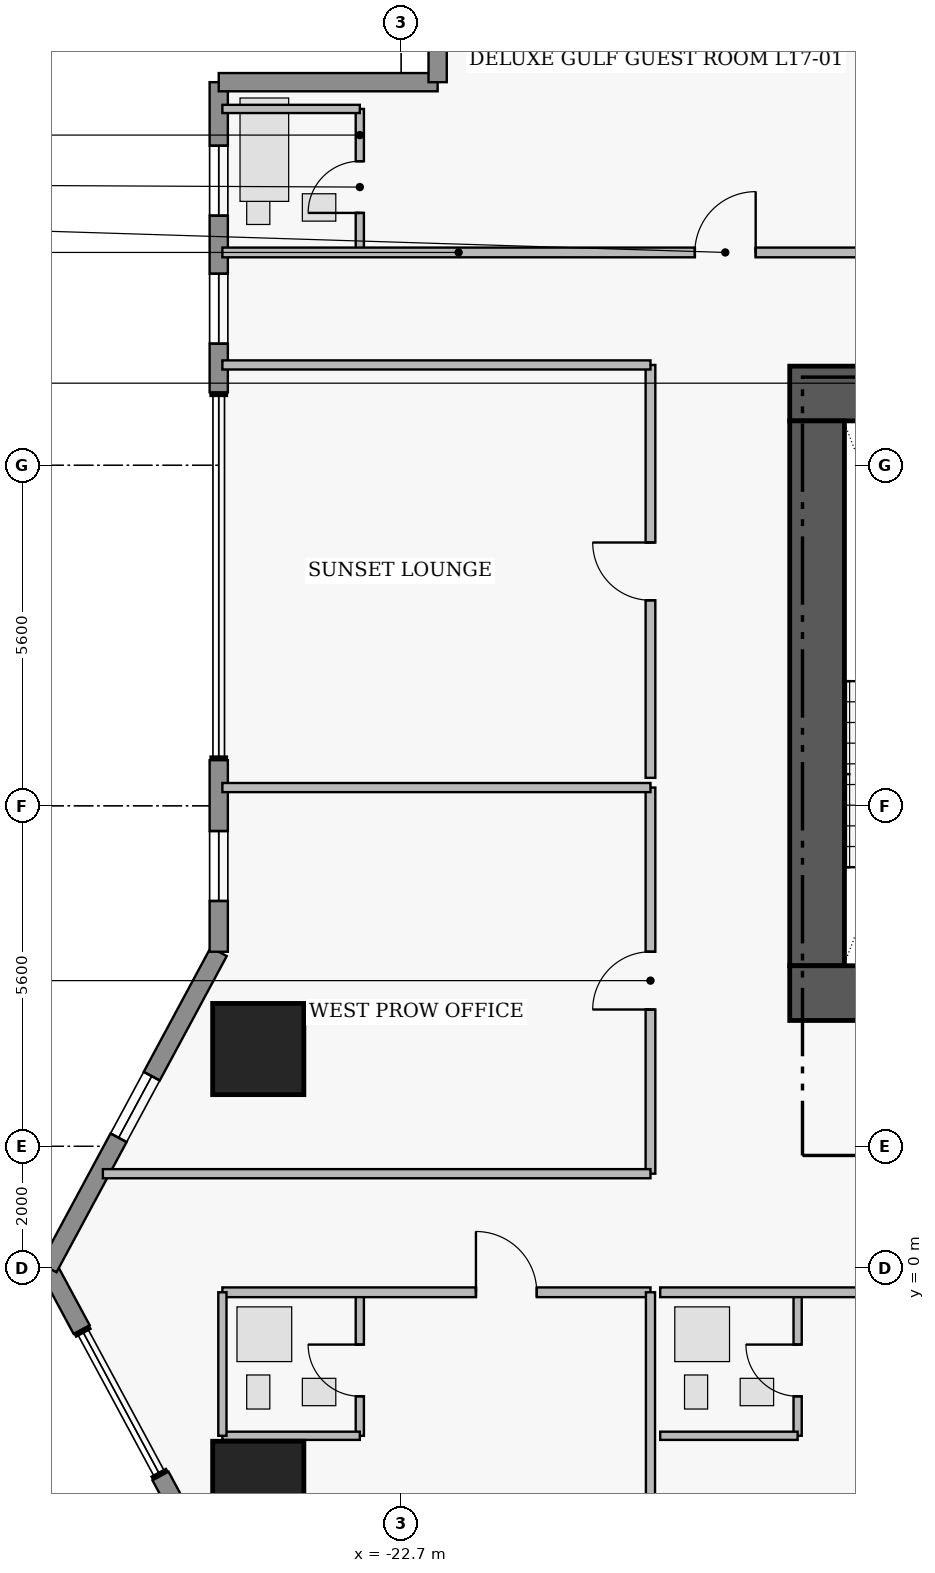
"""IFC4 building model, lengths in metres.
Left out: names, types, materials, properties, quantities, classifications, styles, units other than length and angle.
Written with IfcOpenShell. Run it as: python <this file> out.ifc"""

import sys

from ifc_helpers import new_model, si_unit, direction, frame, frame_2d, origin, origin_2d, place, context, subcontext, project, spatial, rectangle, extrude, element, fill, save


model = new_model("IFC4")
c1 = context("Model", 3, precision=1e-05, world=origin(), true_north=direction((0.0, 1.0)))
c2 = subcontext(c1, "Body", "Model", "MODEL_VIEW")
j1 = project(units=[si_unit("LENGTHUNIT", "METRE"), si_unit("PLANEANGLEUNIT", "RADIAN")], contexts=[c1])
p1 = place(None, origin())
s1 = spatial("IfcSite", under=j1, at=p1, CompositionType="ELEMENT")
p2 = place(p1, origin())
s2 = spatial("IfcBuilding", under=s1, at=p2, CompositionType="ELEMENT")
p3 = place(p2, frame((0.0, 0.0, 71.4)))
s3 = spatial("IfcBuildingStorey", under=s2, at=p3, CompositionType="ELEMENT", Elevation=71.4)
p4 = place(p3, frame((-16.31, 14.38, 0.0), z_axis=(0.0, 0.0, 1.0), x_axis=(1.0, 0.0, 0.0)))
e1 = element("IfcWall", 1, at=p4, inside=s3, PredefinedType="SHEAR", context=c2, shape_type="SweptSolid", body=[
    extrude(rectangle(XDim=4.71, YDim=0.9, at=frame_2d((2.355, 0.0))), origin(), (0.0, 0.0, 1.0), 3.46),
])
p5 = place(p3, frame((-15.86, 4.97, 0.0), z_axis=(0.0, 0.0, 1.0), x_axis=(0.0, 1.0, 0.0)))
e2 = element("IfcWall", 2, at=p5, inside=s3, PredefinedType="SHEAR", context=c2, shape_type="SweptSolid", body=[
    extrude(rectangle(XDim=8.96, YDim=0.9, at=frame_2d((4.48, 0.0))), origin(), (0.0, 0.0, 1.0), 3.46),
])
p6 = place(p3, frame((-16.31, 4.52, 0.0), z_axis=(0.0, 0.0, 1.0), x_axis=(1.0, 0.0, 0.0)))
e3 = element("IfcWall", 3, at=p6, inside=s3, PredefinedType="SHEAR", context=c2, shape_type="SweptSolid", body=[
    extrude(rectangle(XDim=4.71, YDim=0.9, at=frame_2d((2.355, 0.0))), origin(), (0.0, 0.0, 1.0), 3.46),
])
for number, where, z_axis, x_axis in (
    (4, (-25.05, -3.6, 0.0), (0.0, 0.0, 1.0), (1.0, 0.0, 0.0)),
    (5, (-25.05, 3.6, 0.0), (0.0, 0.0, 1.0), (1.0, 0.0, 0.0)),
):
    element("IfcColumn", number, at=place(p3, frame(where, z_axis=z_axis, x_axis=x_axis)), inside=s3, PredefinedType="COLUMN", context=c2, shape_type="SweptSolid", body=[
        extrude(rectangle(XDim=1.5, YDim=1.5, at=origin_2d()), origin(), (0.0, 0.0, 1.0), 3.65),
    ])
p7 = place(p3, frame((-25.7, -5.2, 0.0), z_axis=(0.0, 0.0, 1.0), x_axis=(-0.474121438562, 0.88045946045, 0.0)))
e6 = element("IfcWall", 6, at=p7, inside=s3, PredefinedType="STANDARD", context=c2, shape_type="SweptSolid", body=[
    extrude(rectangle(XDim=2.021, YDim=0.3, at=frame_2d((1.01, 0.0))), origin(), (0.0, 0.0, 1.0), 3.43),
])
p8 = place(p3, frame((-27.955, -1.012, 0.0), z_axis=(0.0, 0.0, 1.0), x_axis=(-0.474099823035, 0.880471099922, 0.0)))
e7 = element("IfcWall", 7, at=p8, inside=s3, PredefinedType="STANDARD", context=c2, shape_type="SweptSolid", body=[
    extrude(rectangle(XDim=1.15, YDim=0.3, at=frame_2d((0.575, 0.0))), origin(), (0.0, 0.0, 1.0), 3.43),
])
p9 = place(p3, frame((-28.5, 0.0, 0.0), z_axis=(0.0, 0.0, 1.0), x_axis=(0.474109683532, 0.880465790352, 0.0)))
e8 = element("IfcWall", 8, at=p9, inside=s3, PredefinedType="STANDARD", context=c2, shape_type="SweptSolid", body=[
    extrude(rectangle(XDim=5.906, YDim=0.3, at=frame_2d((2.953, 0.0))), origin(), (0.0, 0.0, 1.0), 3.43),
])
p10 = place(p9, frame((2.432, 0.0, 0.95)))
e9 = element("IfcOpeningElement", 9, at=p10, cuts=e8, PredefinedType="OPENING", context=c2, shape_type="SweptSolid", body=[
    extrude(rectangle(XDim=1.15, YDim=1.55, at=frame_2d((0.575, 0.775))), frame((0.0, 0.16, 0.0), z_axis=(0.0, -1.0, 0.0), x_axis=(1.0, 0.0, 0.0)), (0.0, 0.0, 1.0), 0.32),
])
p11 = place(p3, frame((-25.7, 5.2, 0.0), z_axis=(0.0, 0.0, 1.0), x_axis=(0.0, 1.0, 0.0)))
e10 = element("IfcWall", 10, at=p11, inside=s3, PredefinedType="STANDARD", context=c2, shape_type="SweptSolid", body=[
    extrude(rectangle(XDim=3.15, YDim=0.3, at=frame_2d((1.575, 0.0))), origin(), (0.0, 0.0, 1.0), 3.43),
])
p12 = place(p11, frame((0.835, 0.0, 0.95)))
e11 = element("IfcOpeningElement", 11, at=p12, cuts=e10, PredefinedType="OPENING", context=c2, shape_type="SweptSolid", body=[
    extrude(rectangle(XDim=1.15, YDim=1.55, at=frame_2d((0.575, 0.775))), frame((0.0, 0.16, 0.0), z_axis=(0.0, -1.0, 0.0), x_axis=(1.0, 0.0, 0.0)), (0.0, 0.0, 1.0), 0.32),
])
p13 = place(p3, frame((-25.7, 14.4, 0.0), z_axis=(0.0, 0.0, 1.0), x_axis=(0.0, 1.0, 0.0)))
e12 = element("IfcWall", 12, at=p13, inside=s3, PredefinedType="STANDARD", context=c2, shape_type="SweptSolid", body=[
    extrude(rectangle(XDim=5.1, YDim=0.3, at=frame_2d((2.55, 0.0))), origin(), (0.0, 0.0, 1.0), 3.43),
])
p14 = place(p13, frame((0.8, 0.0, 0.95)))
e13 = element("IfcOpeningElement", 13, at=p14, cuts=e12, PredefinedType="OPENING", context=c2, shape_type="SweptSolid", body=[
    extrude(rectangle(XDim=1.15, YDim=1.55, at=frame_2d((0.575, 0.775))), frame((0.0, 0.16, 0.0), z_axis=(0.0, -1.0, 0.0), x_axis=(1.0, 0.0, 0.0)), (0.0, 0.0, 1.0), 0.32),
])
p15 = place(p13, frame((2.905, 0.0, 0.95)))
e14 = element("IfcOpeningElement", 14, at=p15, cuts=e12, PredefinedType="OPENING", context=c2, shape_type="SweptSolid", body=[
    extrude(rectangle(XDim=1.15, YDim=1.55, at=frame_2d((0.575, 0.775))), frame((0.0, 0.16, 0.0), z_axis=(0.0, -1.0, 0.0), x_axis=(1.0, 0.0, 0.0)), (0.0, 0.0, 1.0), 0.32),
])
p16 = place(p3, frame((-25.7, 19.5, 0.0), z_axis=(0.0, 0.0, 1.0), x_axis=(1.0, 0.0, 0.0)))
e15 = element("IfcWall", 15, at=p16, inside=s3, PredefinedType="STANDARD", context=c2, shape_type="SweptSolid", body=[
    extrude(rectangle(XDim=3.6, YDim=0.3, at=frame_2d((1.8, 0.0))), origin(), (0.0, 0.0, 1.0), 3.43),
])
p17 = place(p3, frame((-22.1, 19.5, 0.0), z_axis=(0.0, 0.0, 1.0), x_axis=(0.0, 1.0, 0.0)))
e16 = element("IfcWall", 16, at=p17, inside=s3, PredefinedType="STANDARD", context=c2, shape_type="SweptSolid", body=[
    extrude(rectangle(XDim=3.6, YDim=0.3, at=frame_2d((1.8, 0.0))), origin(), (0.0, 0.0, 1.0), 3.43),
])
p18 = place(p3, frame((-23.38, 16.7, 0.0), z_axis=(0.0, 0.0, 1.0), x_axis=(0.0, 1.0, 0.0)))
e17 = element("IfcWall", 17, at=p18, inside=s3, PredefinedType="PLUMBINGWALL", context=c2, shape_type="SweptSolid", body=[
    extrude(rectangle(XDim=2.36, YDim=0.135, at=frame_2d((1.18, 0.0))), origin(), (0.0, 0.0, 1.0), 3.43),
])
p19 = place(p18, frame((0.65, 0.0, 0.0)))
e18 = element("IfcOpeningElement", 18, at=p19, cuts=e17, PredefinedType="OPENING", context=c2, shape_type="SweptSolid", body=[
    extrude(rectangle(XDim=0.85, YDim=2.1, at=frame_2d((0.425, 1.05))), frame((0.0, 0.077, 0.0), z_axis=(0.0, -1.0, 0.0), x_axis=(1.0, 0.0, 0.0)), (0.0, 0.0, 1.0), 0.155),
])
p20 = place(p3, frame((-25.64, 16.7, 0.0), z_axis=(0.0, 0.0, 1.0), x_axis=(1.0, 0.0, 0.0)))
e19 = element("IfcWall", 19, at=p20, inside=s3, PredefinedType="PARTITIONING", context=c2, shape_type="SweptSolid", body=[
    extrude(rectangle(XDim=14.24, YDim=0.16, at=frame_2d((7.12, 0.0))), origin(), (0.0, 0.0, 1.0), 2.973),
])
p21 = place(p20, frame((7.77, 0.0, 0.0)))
e20 = element("IfcOpeningElement", 20, at=p21, cuts=e19, PredefinedType="OPENING", context=c2, shape_type="SweptSolid", body=[
    extrude(rectangle(XDim=1.0, YDim=2.15, at=frame_2d((0.5, 1.075))), frame((0.0, 0.09, 0.0), z_axis=(0.0, -1.0, 0.0), x_axis=(1.0, 0.0, 0.0)), (0.0, 0.0, 1.0), 0.18),
])
p22 = place(p3, frame((-23.38, -2.76, 0.0), z_axis=(0.0, 0.0, 1.0), x_axis=(0.0, 1.0, 0.0)))
e21 = element("IfcWall", 21, at=p22, inside=s3, PredefinedType="PLUMBINGWALL", context=c2, shape_type="SweptSolid", body=[
    extrude(rectangle(XDim=2.36, YDim=0.135, at=frame_2d((1.18, 0.0))), origin(), (0.0, 0.0, 1.0), 3.43),
])
p23 = place(p22, frame((0.65, 0.0, 0.0)))
e22 = element("IfcOpeningElement", 22, at=p23, cuts=e21, PredefinedType="OPENING", context=c2, shape_type="SweptSolid", body=[
    extrude(rectangle(XDim=0.85, YDim=2.1, at=frame_2d((0.425, 1.05))), frame((0.0, 0.077, 0.0), z_axis=(0.0, -1.0, 0.0), x_axis=(1.0, 0.0, 0.0)), (0.0, 0.0, 1.0), 0.155),
])
p24 = place(p3, frame((-25.64, -0.4, 0.0), z_axis=(0.0, 0.0, 1.0), x_axis=(1.0, 0.0, 0.0)))
e23 = element("IfcWall", 23, at=p24, inside=s3, PredefinedType="PARTITIONING", context=c2, shape_type="SweptSolid", body=[
    extrude(rectangle(XDim=7.04, YDim=0.16, at=frame_2d((3.52, 0.0))), origin(), (0.0, 0.0, 1.0), 3.43),
])
p25 = place(p24, frame((4.17, 0.0, 0.0)))
e24 = element("IfcOpeningElement", 24, at=p25, cuts=e23, PredefinedType="OPENING", context=c2, shape_type="SweptSolid", body=[
    extrude(rectangle(XDim=1.0, YDim=2.15, at=frame_2d((0.5, 1.075))), frame((0.0, 0.09, 0.0), z_axis=(0.0, -1.0, 0.0), x_axis=(1.0, 0.0, 0.0)), (0.0, 0.0, 1.0), 0.18),
])
p26 = place(p3, frame((-16.18, -2.76, 0.0), z_axis=(0.0, 0.0, 1.0), x_axis=(0.0, 1.0, 0.0)))
e25 = element("IfcWall", 25, at=p26, inside=s3, PredefinedType="PLUMBINGWALL", context=c2, shape_type="SweptSolid", body=[
    extrude(rectangle(XDim=2.36, YDim=0.135, at=frame_2d((1.18, 0.0))), origin(), (0.0, 0.0, 1.0), 3.43),
])
p27 = place(p26, frame((0.65, 0.0, 0.0)))
e26 = element("IfcOpeningElement", 26, at=p27, cuts=e25, PredefinedType="OPENING", context=c2, shape_type="SweptSolid", body=[
    extrude(rectangle(XDim=0.85, YDim=2.1, at=frame_2d((0.425, 1.05))), frame((0.0, 0.077, 0.0), z_axis=(0.0, -1.0, 0.0), x_axis=(1.0, 0.0, 0.0)), (0.0, 0.0, 1.0), 0.155),
])
p28 = place(p3, frame((-18.44, -0.4, 0.0), z_axis=(0.0, 0.0, 1.0), x_axis=(1.0, 0.0, 0.0)))
e27 = element("IfcWall", 27, at=p28, inside=s3, PredefinedType="PARTITIONING", context=c2, shape_type="SweptSolid", body=[
    extrude(rectangle(XDim=7.04, YDim=0.16, at=frame_2d((3.52, 0.0))), origin(), (0.0, 0.0, 1.0), 3.43),
])
p29 = place(p28, frame((4.17, 0.0, 0.0)))
e28 = element("IfcOpeningElement", 28, at=p29, cuts=e27, PredefinedType="OPENING", context=c2, shape_type="SweptSolid", body=[
    extrude(rectangle(XDim=1.0, YDim=2.15, at=frame_2d((0.5, 1.075))), frame((0.0, 0.09, 0.0), z_axis=(0.0, -1.0, 0.0), x_axis=(1.0, 0.0, 0.0)), (0.0, 0.0, 1.0), 0.18),
])
p30 = place(p3, frame((-18.6, 1.55, 0.0), z_axis=(0.0, 0.0, 1.0), x_axis=(0.0, 1.0, 0.0)))
e29 = element("IfcWall", 29, at=p30, inside=s3, PredefinedType="PARTITIONING", context=c2, shape_type="SweptSolid", body=[
    extrude(rectangle(XDim=6.35, YDim=0.16, at=frame_2d((3.175, 0.0))), origin(), (0.0, 0.0, 1.0), 3.43),
])
p31 = place(p30, frame((2.7, 0.0, 0.0)))
e30 = element("IfcOpeningElement", 30, at=p31, cuts=e29, PredefinedType="OPENING", context=c2, shape_type="SweptSolid", body=[
    extrude(rectangle(XDim=0.95, YDim=2.15, at=frame_2d((0.475, 1.075))), frame((0.0, 0.09, 0.0), z_axis=(0.0, -1.0, 0.0), x_axis=(1.0, 0.0, 0.0)), (0.0, 0.0, 1.0), 0.18),
])
p32 = place(p3, frame((-18.6, 8.06, 0.0), z_axis=(0.0, 0.0, 1.0), x_axis=(0.0, 1.0, 0.0)))
e31 = element("IfcWall", 31, at=p32, inside=s3, PredefinedType="PARTITIONING", context=c2, shape_type="SweptSolid", body=[
    extrude(rectangle(XDim=6.79, YDim=0.16, at=frame_2d((3.395, 0.0))), origin(), (0.0, 0.0, 1.0), 3.43),
])
p33 = place(p32, frame((2.92, 0.0, 0.0)))
e32 = element("IfcOpeningElement", 32, at=p33, cuts=e31, PredefinedType="OPENING", context=c2, shape_type="SweptSolid", body=[
    extrude(rectangle(XDim=0.95, YDim=2.15, at=frame_2d((0.475, 1.075))), frame((0.0, 0.09, 0.0), z_axis=(0.0, -1.0, 0.0), x_axis=(1.0, 0.0, 0.0)), (0.0, 0.0, 1.0), 0.18),
])
for number, where, z_axis, x_axis in (
    (33, (-25.64, 19.06, 0.0), (0.0, 0.0, 1.0), (1.0, 0.0, 0.0)),
    (34, (-25.64, -2.76, 0.0), (0.0, 0.0, 1.0), (1.0, 0.0, 0.0)),
):
    element("IfcWall", number, at=place(p3, frame(where, z_axis=z_axis, x_axis=x_axis)), inside=s3, PredefinedType="PLUMBINGWALL", context=c2, shape_type="SweptSolid", body=[
        extrude(rectangle(XDim=2.26, YDim=0.135, at=frame_2d((1.13, 0.0))), origin(), (0.0, 0.0, 1.0), 3.43),
    ])
p34 = place(p3, frame((-25.64, -2.76, 0.0), z_axis=(0.0, 0.0, 1.0), x_axis=(0.0, 1.0, 0.0)))
e35 = element("IfcWall", 35, at=p34, inside=s3, PredefinedType="PLUMBINGWALL", context=c2, shape_type="SweptSolid", body=[
    extrude(rectangle(XDim=2.36, YDim=0.135, at=frame_2d((1.18, 0.0))), origin(), (0.0, 0.0, 1.0), 3.43),
])
p35 = place(p3, frame((-18.6, -23.02, 0.0), z_axis=(0.0, 0.0, 1.0), x_axis=(0.0, 1.0, 0.0)))
e36 = element("IfcWall", 36, at=p35, inside=s3, PredefinedType="PARTITIONING", context=c2, shape_type="SweptSolid", body=[
    extrude(rectangle(XDim=22.62, YDim=0.15, at=frame_2d((11.31, 0.0))), origin(), (0.0, 0.0, 1.0), 3.43),
])
p36 = place(p3, frame((-18.44, -2.76, 0.0), z_axis=(0.0, 0.0, 1.0), x_axis=(1.0, 0.0, 0.0)))
e37 = element("IfcWall", 37, at=p36, inside=s3, PredefinedType="PLUMBINGWALL", context=c2, shape_type="SweptSolid", body=[
    extrude(rectangle(XDim=2.26, YDim=0.135, at=frame_2d((1.13, 0.0))), origin(), (0.0, 0.0, 1.0), 3.43),
])
p37 = place(p3, frame((-27.605, 1.55, 0.0), z_axis=(0.0, 0.0, 1.0), x_axis=(1.0, 0.0, 0.0)))
e38 = element("IfcWall", 38, at=p37, inside=s3, PredefinedType="PARTITIONING", context=c2, shape_type="SweptSolid", body=[
    extrude(rectangle(XDim=9.005, YDim=0.15, at=frame_2d((4.503, 0.0))), origin(), (0.0, 0.0, 1.0), 3.43),
])
for number, where, z_axis, x_axis in (
    (39, (-25.64, 7.9, 0.0), (0.0, 0.0, 1.0), (1.0, 0.0, 0.0)),
    (40, (-25.64, 14.85, 0.0), (0.0, 0.0, 1.0), (1.0, 0.0, 0.0)),
):
    element("IfcWall", number, at=place(p3, frame(where, z_axis=z_axis, x_axis=x_axis)), inside=s3, PredefinedType="PARTITIONING", context=c2, shape_type="SweptSolid", body=[
        extrude(rectangle(XDim=7.04, YDim=0.15, at=frame_2d((3.52, 0.0))), origin(), (0.0, 0.0, 1.0), 3.43),
    ])
p38 = place(p10, origin())
e41 = element("IfcWindow", 41, at=p38, inside=s3, PartitioningType="SINGLE_PANEL", PredefinedType="WINDOW", context=c2, shape_type="SweptSolid", body=[
    extrude(rectangle(XDim=1.15, YDim=1.55, at=frame_2d((0.575, 0.775))), frame((0.0, 0.03, 0.0), z_axis=(0.0, -1.0, 0.0), x_axis=(1.0, 0.0, 0.0)), (0.0, 0.0, 1.0), 0.06),
])
fill(e9, e41)
p39 = place(p12, origin())
e42 = element("IfcWindow", 42, at=p39, inside=s3, PartitioningType="SINGLE_PANEL", PredefinedType="WINDOW", context=c2, shape_type="SweptSolid", body=[
    extrude(rectangle(XDim=1.15, YDim=1.55, at=frame_2d((0.575, 0.775))), frame((0.0, 0.03, 0.0), z_axis=(0.0, -1.0, 0.0), x_axis=(1.0, 0.0, 0.0)), (0.0, 0.0, 1.0), 0.06),
])
fill(e11, e42)
p40 = place(p14, origin())
e43 = element("IfcWindow", 43, at=p40, inside=s3, PartitioningType="SINGLE_PANEL", PredefinedType="WINDOW", context=c2, shape_type="SweptSolid", body=[
    extrude(rectangle(XDim=1.15, YDim=1.55, at=frame_2d((0.575, 0.775))), frame((0.0, 0.03, 0.0), z_axis=(0.0, -1.0, 0.0), x_axis=(1.0, 0.0, 0.0)), (0.0, 0.0, 1.0), 0.06),
])
fill(e13, e43)
p41 = place(p15, origin())
e44 = element("IfcWindow", 44, at=p41, inside=s3, PartitioningType="SINGLE_PANEL", PredefinedType="WINDOW", context=c2, shape_type="SweptSolid", body=[
    extrude(rectangle(XDim=1.15, YDim=1.55, at=frame_2d((0.575, 0.775))), frame((0.0, 0.03, 0.0), z_axis=(0.0, -1.0, 0.0), x_axis=(1.0, 0.0, 0.0)), (0.0, 0.0, 1.0), 0.06),
])
fill(e14, e44)
p42 = place(p19, origin())
e45 = element("IfcDoor", 45, at=p42, inside=s3, OperationType="SINGLE_SWING_LEFT", PredefinedType="DOOR", context=c2, shape_type="SweptSolid", body=[
    extrude(rectangle(XDim=0.85, YDim=2.1, at=frame_2d((0.425, 1.05))), frame((0.0, 0.025, 0.0), z_axis=(0.0, -1.0, 0.0), x_axis=(1.0, 0.0, 0.0)), (0.0, 0.0, 1.0), 0.05),
])
fill(e18, e45)
p43 = place(p21, origin())
e46 = element("IfcDoor", 46, at=p43, inside=s3, OperationType="SINGLE_SWING_RIGHT", PredefinedType="DOOR", context=c2, shape_type="SweptSolid", body=[
    extrude(rectangle(XDim=1.0, YDim=2.15, at=frame_2d((0.5, 1.075))), frame((0.0, 0.025, 0.0), z_axis=(0.0, -1.0, 0.0), x_axis=(1.0, 0.0, 0.0)), (0.0, 0.0, 1.0), 0.05),
])
fill(e20, e46)
p44 = place(p23, origin())
e47 = element("IfcDoor", 47, at=p44, inside=s3, OperationType="SINGLE_SWING_RIGHT", PredefinedType="DOOR", context=c2, shape_type="SweptSolid", body=[
    extrude(rectangle(XDim=0.85, YDim=2.1, at=frame_2d((0.425, 1.05))), frame((0.0, 0.025, 0.0), z_axis=(0.0, -1.0, 0.0), x_axis=(1.0, 0.0, 0.0)), (0.0, 0.0, 1.0), 0.05),
])
fill(e22, e47)
p45 = place(p25, origin())
e48 = element("IfcDoor", 48, at=p45, inside=s3, OperationType="SINGLE_SWING_LEFT", PredefinedType="DOOR", context=c2, shape_type="SweptSolid", body=[
    extrude(rectangle(XDim=1.0, YDim=2.15, at=frame_2d((0.5, 1.075))), frame((0.0, 0.025, 0.0), z_axis=(0.0, -1.0, 0.0), x_axis=(1.0, 0.0, 0.0)), (0.0, 0.0, 1.0), 0.05),
])
fill(e24, e48)
p46 = place(p27, origin())
e49 = element("IfcDoor", 49, at=p46, inside=s3, OperationType="SINGLE_SWING_RIGHT", PredefinedType="DOOR", context=c2, shape_type="SweptSolid", body=[
    extrude(rectangle(XDim=0.85, YDim=2.1, at=frame_2d((0.425, 1.05))), frame((0.0, 0.025, 0.0), z_axis=(0.0, -1.0, 0.0), x_axis=(1.0, 0.0, 0.0)), (0.0, 0.0, 1.0), 0.05),
])
fill(e26, e49)
p47 = place(p31, origin())
e50 = element("IfcDoor", 50, at=p47, inside=s3, OperationType="SINGLE_SWING_LEFT", PredefinedType="DOOR", context=c2, shape_type="SweptSolid", body=[
    extrude(rectangle(XDim=0.95, YDim=2.15, at=frame_2d((0.475, 1.075))), frame((0.0, 0.025, 0.0), z_axis=(0.0, -1.0, 0.0), x_axis=(1.0, 0.0, 0.0)), (0.0, 0.0, 1.0), 0.05),
])
fill(e30, e50)
p48 = place(p33, origin())
e51 = element("IfcDoor", 51, at=p48, inside=s3, OperationType="SINGLE_SWING_RIGHT", PredefinedType="DOOR", context=c2, shape_type="SweptSolid", body=[
    extrude(rectangle(XDim=0.95, YDim=2.15, at=frame_2d((0.475, 1.075))), frame((0.0, 0.025, 0.0), z_axis=(0.0, -1.0, 0.0), x_axis=(1.0, 0.0, 0.0)), (0.0, 0.0, 1.0), 0.05),
])
fill(e32, e51)
save(model, sys.argv[1])
